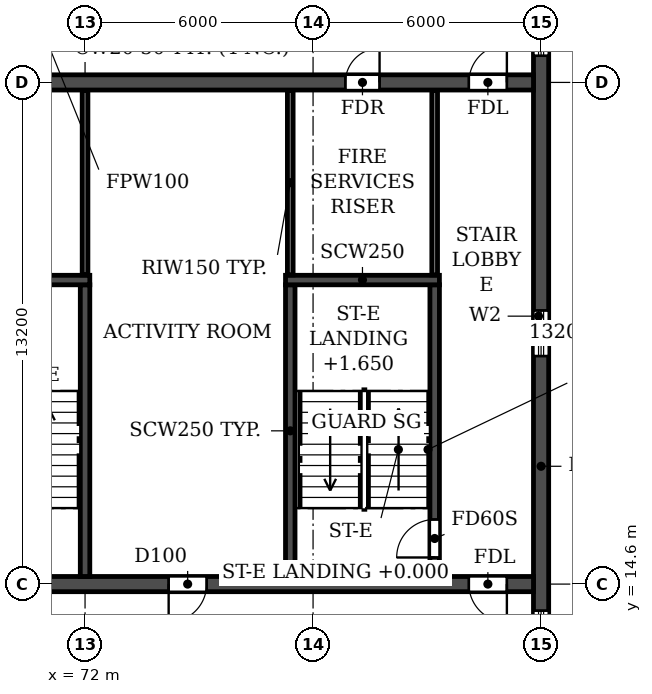
"""IFC4 building model, lengths in metres.
Left out: names, types, materials, properties, quantities, classifications, styles, units other than length and angle.
Written with IfcOpenShell. Run it as: python <this file> out.ifc"""

import sys

from ifc_helpers import new_model, si_unit, direction, frame, frame_2d, origin, place, context, subcontext, project, spatial, rectangle, extrude, element, fill, save


model = new_model("IFC4")
c1 = context("Model", 3, precision=1e-05, world=origin(), true_north=direction((0.0, 1.0)))
c2 = subcontext(c1, "Body", "Model", "MODEL_VIEW")
j1 = project(units=[si_unit("LENGTHUNIT", "METRE"), si_unit("PLANEANGLEUNIT", "RADIAN")], contexts=[c1])
p1 = place(None, origin())
s1 = spatial("IfcSite", under=j1, at=p1, CompositionType="ELEMENT")
p2 = place(p1, origin())
s2 = spatial("IfcBuilding", under=s1, at=p2, CompositionType="ELEMENT")
p3 = place(p2, frame((0.0, 0.0, 175.2)))
s3 = spatial("IfcBuildingStorey", under=s2, at=p3, CompositionType="ELEMENT", Elevation=175.2)
p4 = place(p3, frame((84.0, 4.683, 0.0), z_axis=(0.0, 0.0, 1.0), x_axis=(0.0, 1.0, 0.0)))
e1 = element("IfcWall", 1, at=p4, inside=s3, PredefinedType="SHEAR", context=c2, shape_type="SweptSolid", body=[
    extrude(rectangle(XDim=31.834, YDim=0.4, at=frame_2d((15.917, 0.0))), origin(), (0.0, 0.0, 1.0), 3.08),
])
p5 = place(p4, frame((23.817, 0.0, 0.9)))
e2 = element("IfcOpeningElement", 2, at=p5, cuts=e1, PredefinedType="OPENING", context=c2, shape_type="SweptSolid", body=[
    extrude(rectangle(XDim=1.2, YDim=1.5, at=frame_2d((0.6, 0.75))), frame((0.0, 0.21, 0.0), z_axis=(0.0, -1.0, 0.0), x_axis=(1.0, 0.0, 0.0)), (0.0, 0.0, 1.0), 0.42),
])
p6 = place(p4, frame((8.017, 0.0, 0.9)))
e3 = element("IfcOpeningElement", 3, at=p6, cuts=e1, PredefinedType="OPENING", context=c2, shape_type="SweptSolid", body=[
    extrude(rectangle(XDim=1.2, YDim=1.5, at=frame_2d((0.6, 0.75))), frame((0.0, 0.21, 0.0), z_axis=(0.0, -1.0, 0.0), x_axis=(1.0, 0.0, 0.0)), (0.0, 0.0, 1.0), 0.42),
])
p7 = place(p4, frame((27.694, 0.0, 0.6)))
e4 = element("IfcOpeningElement", 4, at=p7, cuts=e1, PredefinedType="OPENING", context=c2, shape_type="SweptSolid", body=[
    extrude(rectangle(XDim=2.2, YDim=1.8, at=frame_2d((1.1, 0.9))), frame((0.0, 0.21, 0.0), z_axis=(0.0, -1.0, 0.0), x_axis=(1.0, 0.0, 0.0)), (0.0, 0.0, 1.0), 0.42),
])
p8 = place(p4, frame((2.541, 0.0, 0.6)))
e5 = element("IfcOpeningElement", 5, at=p8, cuts=e1, PredefinedType="OPENING", context=c2, shape_type="SweptSolid", body=[
    extrude(rectangle(XDim=2.2, YDim=1.8, at=frame_2d((1.1, 0.9))), frame((0.0, 0.21, 0.0), z_axis=(0.0, -1.0, 0.0), x_axis=(1.0, 0.0, 0.0)), (0.0, 0.0, 1.0), 0.42),
])
p9 = place(p4, frame((15.917, 0.0, 0.9)))
e6 = element("IfcOpeningElement", 6, at=p9, cuts=e1, PredefinedType="OPENING", context=c2, shape_type="SweptSolid", body=[
    extrude(rectangle(XDim=1.2, YDim=1.5, at=frame_2d((0.6, 0.75))), frame((0.0, 0.21, 0.0), z_axis=(0.0, -1.0, 0.0), x_axis=(1.0, 0.0, 0.0)), (0.0, 0.0, 1.0), 0.42),
])
p10 = place(p3, frame((18.2, 14.6, 0.0), z_axis=(0.0, 0.0, 1.0), x_axis=(1.0, 0.0, 0.0)))
e7 = element("IfcWall", 7, at=p10, inside=s3, PredefinedType="SOLIDWALL", context=c2, shape_type="SweptSolid", body=[
    extrude(rectangle(XDim=65.6, YDim=0.4, at=frame_2d((32.8, 0.0))), origin(), (0.0, 0.0, 1.0), 3.08),
])
p11 = place(p10, frame((0.7, 0.0, 0.0)))
e8 = element("IfcOpeningElement", 8, at=p11, cuts=e7, PredefinedType="OPENING", context=c2, shape_type="SweptSolid", body=[
    extrude(rectangle(XDim=1.0, YDim=2.1, at=frame_2d((0.5, 1.05))), frame((0.0, 0.21, 0.0), z_axis=(0.0, -1.0, 0.0), x_axis=(1.0, 0.0, 0.0)), (0.0, 0.0, 1.0), 0.42),
])
p12 = place(p10, frame((8.6, 0.0, 0.0)))
e9 = element("IfcOpeningElement", 9, at=p12, cuts=e7, PredefinedType="OPENING", context=c2, shape_type="SweptSolid", body=[
    extrude(rectangle(XDim=1.0, YDim=2.1, at=frame_2d((0.5, 1.05))), frame((0.0, 0.21, 0.0), z_axis=(0.0, -1.0, 0.0), x_axis=(1.0, 0.0, 0.0)), (0.0, 0.0, 1.0), 0.42),
])
p13 = place(p10, frame((13.2, 0.0, 0.0)))
e10 = element("IfcOpeningElement", 10, at=p13, cuts=e7, PredefinedType="OPENING", context=c2, shape_type="SweptSolid", body=[
    extrude(rectangle(XDim=1.0, YDim=2.1, at=frame_2d((0.5, 1.05))), frame((0.0, 0.21, 0.0), z_axis=(0.0, -1.0, 0.0), x_axis=(1.0, 0.0, 0.0)), (0.0, 0.0, 1.0), 0.42),
])
p14 = place(p10, frame((25.8, 0.0, 0.0)))
e11 = element("IfcOpeningElement", 11, at=p14, cuts=e7, PredefinedType="OPENING", context=c2, shape_type="SweptSolid", body=[
    extrude(rectangle(XDim=1.0, YDim=2.1, at=frame_2d((0.5, 1.05))), frame((0.0, 0.21, 0.0), z_axis=(0.0, -1.0, 0.0), x_axis=(1.0, 0.0, 0.0)), (0.0, 0.0, 1.0), 0.42),
])
p15 = place(p10, frame((29.7, 0.0, 0.0)))
e12 = element("IfcOpeningElement", 12, at=p15, cuts=e7, PredefinedType="OPENING", context=c2, shape_type="SweptSolid", body=[
    extrude(rectangle(XDim=1.0, YDim=2.1, at=frame_2d((0.5, 1.05))), frame((0.0, 0.21, 0.0), z_axis=(0.0, -1.0, 0.0), x_axis=(1.0, 0.0, 0.0)), (0.0, 0.0, 1.0), 0.42),
])
p16 = place(p10, frame((32.3, 0.0, 0.0)))
e13 = element("IfcOpeningElement", 13, at=p16, cuts=e7, PredefinedType="OPENING", context=c2, shape_type="SweptSolid", body=[
    extrude(rectangle(XDim=1.0, YDim=2.1, at=frame_2d((0.5, 1.05))), frame((0.0, 0.21, 0.0), z_axis=(0.0, -1.0, 0.0), x_axis=(1.0, 0.0, 0.0)), (0.0, 0.0, 1.0), 0.42),
])
p17 = place(p10, frame((37.5, 0.0, 0.0)))
e14 = element("IfcOpeningElement", 14, at=p17, cuts=e7, PredefinedType="OPENING", context=c2, shape_type="SweptSolid", body=[
    extrude(rectangle(XDim=1.0, YDim=2.1, at=frame_2d((0.5, 1.05))), frame((0.0, 0.21, 0.0), z_axis=(0.0, -1.0, 0.0), x_axis=(1.0, 0.0, 0.0)), (0.0, 0.0, 1.0), 0.42),
])
p18 = place(p10, frame((51.4, 0.0, 0.0)))
e15 = element("IfcOpeningElement", 15, at=p18, cuts=e7, PredefinedType="OPENING", context=c2, shape_type="SweptSolid", body=[
    extrude(rectangle(XDim=1.0, YDim=2.1, at=frame_2d((0.5, 1.05))), frame((0.0, 0.21, 0.0), z_axis=(0.0, -1.0, 0.0), x_axis=(1.0, 0.0, 0.0)), (0.0, 0.0, 1.0), 0.42),
])
p19 = place(p10, frame((56.0, 0.0, 0.0)))
e16 = element("IfcOpeningElement", 16, at=p19, cuts=e7, PredefinedType="OPENING", context=c2, shape_type="SweptSolid", body=[
    extrude(rectangle(XDim=1.0, YDim=2.1, at=frame_2d((0.5, 1.05))), frame((0.0, 0.21, 0.0), z_axis=(0.0, -1.0, 0.0), x_axis=(1.0, 0.0, 0.0)), (0.0, 0.0, 1.0), 0.42),
])
p20 = place(p10, frame((63.9, 0.0, 0.0)))
e17 = element("IfcOpeningElement", 17, at=p20, cuts=e7, PredefinedType="OPENING", context=c2, shape_type="SweptSolid", body=[
    extrude(rectangle(XDim=1.0, YDim=2.1, at=frame_2d((0.5, 1.05))), frame((0.0, 0.21, 0.0), z_axis=(0.0, -1.0, 0.0), x_axis=(1.0, 0.0, 0.0)), (0.0, 0.0, 1.0), 0.42),
])
p21 = place(p3, frame((18.2, 27.8, 0.0), z_axis=(0.0, 0.0, 1.0), x_axis=(1.0, 0.0, 0.0)))
e18 = element("IfcWall", 18, at=p21, inside=s3, PredefinedType="SOLIDWALL", context=c2, shape_type="SweptSolid", body=[
    extrude(rectangle(XDim=65.6, YDim=0.4, at=frame_2d((32.8, 0.0))), origin(), (0.0, 0.0, 1.0), 3.08),
])
p22 = place(p21, frame((0.7, 0.0, 0.0)))
e19 = element("IfcOpeningElement", 19, at=p22, cuts=e18, PredefinedType="OPENING", context=c2, shape_type="SweptSolid", body=[
    extrude(rectangle(XDim=1.0, YDim=2.1, at=frame_2d((0.5, 1.05))), frame((0.0, 0.21, 0.0), z_axis=(0.0, -1.0, 0.0), x_axis=(1.0, 0.0, 0.0)), (0.0, 0.0, 1.0), 0.42),
])
p23 = place(p21, frame((4.05, 0.0, 0.0)))
e20 = element("IfcOpeningElement", 20, at=p23, cuts=e18, PredefinedType="OPENING", context=c2, shape_type="SweptSolid", body=[
    extrude(rectangle(XDim=0.9, YDim=2.1, at=frame_2d((0.45, 1.05))), frame((0.0, 0.21, 0.0), z_axis=(0.0, -1.0, 0.0), x_axis=(1.0, 0.0, 0.0)), (0.0, 0.0, 1.0), 0.42),
])
p24 = place(p21, frame((13.25, 0.0, 0.0)))
e21 = element("IfcOpeningElement", 21, at=p24, cuts=e18, PredefinedType="OPENING", context=c2, shape_type="SweptSolid", body=[
    extrude(rectangle(XDim=0.9, YDim=2.1, at=frame_2d((0.45, 1.05))), frame((0.0, 0.21, 0.0), z_axis=(0.0, -1.0, 0.0), x_axis=(1.0, 0.0, 0.0)), (0.0, 0.0, 1.0), 0.42),
])
p25 = place(p21, frame((17.7, 0.0, 0.0)))
e22 = element("IfcOpeningElement", 22, at=p25, cuts=e18, PredefinedType="OPENING", context=c2, shape_type="SweptSolid", body=[
    extrude(rectangle(XDim=1.0, YDim=2.1, at=frame_2d((0.5, 1.05))), frame((0.0, 0.21, 0.0), z_axis=(0.0, -1.0, 0.0), x_axis=(1.0, 0.0, 0.0)), (0.0, 0.0, 1.0), 0.42),
])
p26 = place(p21, frame((22.9, 0.0, 0.0)))
e23 = element("IfcOpeningElement", 23, at=p26, cuts=e18, PredefinedType="OPENING", context=c2, shape_type="SweptSolid", body=[
    extrude(rectangle(XDim=1.0, YDim=2.1, at=frame_2d((0.5, 1.05))), frame((0.0, 0.21, 0.0), z_axis=(0.0, -1.0, 0.0), x_axis=(1.0, 0.0, 0.0)), (0.0, 0.0, 1.0), 0.42),
])
p27 = place(p21, frame((29.4, 0.0, 0.0)))
e24 = element("IfcOpeningElement", 24, at=p27, cuts=e18, PredefinedType="OPENING", context=c2, shape_type="SweptSolid", body=[
    extrude(rectangle(XDim=1.0, YDim=2.1, at=frame_2d((0.5, 1.05))), frame((0.0, 0.21, 0.0), z_axis=(0.0, -1.0, 0.0), x_axis=(1.0, 0.0, 0.0)), (0.0, 0.0, 1.0), 0.42),
])
p28 = place(p21, frame((32.3, 0.0, 0.0)))
e25 = element("IfcOpeningElement", 25, at=p28, cuts=e18, PredefinedType="OPENING", context=c2, shape_type="SweptSolid", body=[
    extrude(rectangle(XDim=1.0, YDim=2.1, at=frame_2d((0.5, 1.05))), frame((0.0, 0.21, 0.0), z_axis=(0.0, -1.0, 0.0), x_axis=(1.0, 0.0, 0.0)), (0.0, 0.0, 1.0), 0.42),
])
p29 = place(p21, frame((36.5, 0.0, 0.0)))
e26 = element("IfcOpeningElement", 26, at=p29, cuts=e18, PredefinedType="OPENING", context=c2, shape_type="SweptSolid", body=[
    extrude(rectangle(XDim=1.0, YDim=2.1, at=frame_2d((0.5, 1.05))), frame((0.0, 0.21, 0.0), z_axis=(0.0, -1.0, 0.0), x_axis=(1.0, 0.0, 0.0)), (0.0, 0.0, 1.0), 0.42),
])
p30 = place(p21, frame((41.7, 0.0, 0.0)))
e27 = element("IfcOpeningElement", 27, at=p30, cuts=e18, PredefinedType="OPENING", context=c2, shape_type="SweptSolid", body=[
    extrude(rectangle(XDim=1.0, YDim=2.1, at=frame_2d((0.5, 1.05))), frame((0.0, 0.21, 0.0), z_axis=(0.0, -1.0, 0.0), x_axis=(1.0, 0.0, 0.0)), (0.0, 0.0, 1.0), 0.42),
])
p31 = place(p21, frame((45.6, 0.0, 0.0)))
e28 = element("IfcOpeningElement", 28, at=p31, cuts=e18, PredefinedType="OPENING", context=c2, shape_type="SweptSolid", body=[
    extrude(rectangle(XDim=1.0, YDim=2.1, at=frame_2d((0.5, 1.05))), frame((0.0, 0.21, 0.0), z_axis=(0.0, -1.0, 0.0), x_axis=(1.0, 0.0, 0.0)), (0.0, 0.0, 1.0), 0.42),
])
p32 = place(p21, frame((48.2, 0.0, 0.0)))
e29 = element("IfcOpeningElement", 29, at=p32, cuts=e18, PredefinedType="OPENING", context=c2, shape_type="SweptSolid", body=[
    extrude(rectangle(XDim=1.0, YDim=2.1, at=frame_2d((0.5, 1.05))), frame((0.0, 0.21, 0.0), z_axis=(0.0, -1.0, 0.0), x_axis=(1.0, 0.0, 0.0)), (0.0, 0.0, 1.0), 0.42),
])
p33 = place(p21, frame((51.45, 0.0, 0.0)))
e30 = element("IfcOpeningElement", 30, at=p33, cuts=e18, PredefinedType="OPENING", context=c2, shape_type="SweptSolid", body=[
    extrude(rectangle(XDim=0.9, YDim=2.1, at=frame_2d((0.45, 1.05))), frame((0.0, 0.21, 0.0), z_axis=(0.0, -1.0, 0.0), x_axis=(1.0, 0.0, 0.0)), (0.0, 0.0, 1.0), 0.42),
])
p34 = place(p21, frame((60.65, 0.0, 0.0)))
e31 = element("IfcOpeningElement", 31, at=p34, cuts=e18, PredefinedType="OPENING", context=c2, shape_type="SweptSolid", body=[
    extrude(rectangle(XDim=0.9, YDim=2.1, at=frame_2d((0.45, 1.05))), frame((0.0, 0.21, 0.0), z_axis=(0.0, -1.0, 0.0), x_axis=(1.0, 0.0, 0.0)), (0.0, 0.0, 1.0), 0.42),
])
p35 = place(p21, frame((63.9, 0.0, 0.0)))
e32 = element("IfcOpeningElement", 32, at=p35, cuts=e18, PredefinedType="OPENING", context=c2, shape_type="SweptSolid", body=[
    extrude(rectangle(XDim=1.0, YDim=2.1, at=frame_2d((0.5, 1.05))), frame((0.0, 0.21, 0.0), z_axis=(0.0, -1.0, 0.0), x_axis=(1.0, 0.0, 0.0)), (0.0, 0.0, 1.0), 0.42),
])
p36 = place(p3, frame((72.0, 14.8, 0.0), z_axis=(0.0, 0.0, 1.0), x_axis=(0.0, 1.0, 0.0)))
e33 = element("IfcWall", 33, at=p36, inside=s3, PredefinedType="SOLIDWALL", context=c2, shape_type="SweptSolid", body=[
    extrude(rectangle(XDim=7.675, YDim=0.25, at=frame_2d((3.837, 0.0))), origin(), (0.0, 0.0, 1.0), 3.08),
])
p37 = place(p3, frame((68.075, 22.6, 0.0), z_axis=(0.0, 0.0, 1.0), x_axis=(1.0, 0.0, 0.0)))
e34 = element("IfcWall", 34, at=p37, inside=s3, PredefinedType="SOLIDWALL", context=c2, shape_type="SweptSolid", body=[
    extrude(rectangle(XDim=4.05, YDim=0.25, at=frame_2d((2.025, 0.0))), origin(), (0.0, 0.0, 1.0), 3.08),
])
p38 = place(p3, frame((77.4, 14.8, 0.0), z_axis=(0.0, 0.0, 1.0), x_axis=(0.0, 1.0, 0.0)))
e35 = element("IfcWall", 35, at=p38, inside=s3, PredefinedType="SOLIDWALL", context=c2, shape_type="SweptSolid", body=[
    extrude(rectangle(XDim=7.675, YDim=0.25, at=frame_2d((3.837, 0.0))), origin(), (0.0, 0.0, 1.0), 3.08),
])
p39 = place(p3, frame((81.2, 14.8, 0.0), z_axis=(0.0, 0.0, 1.0), x_axis=(0.0, 1.0, 0.0)))
e36 = element("IfcWall", 36, at=p39, inside=s3, PredefinedType="SOLIDWALL", context=c2, shape_type="SweptSolid", body=[
    extrude(rectangle(XDim=7.675, YDim=0.25, at=frame_2d((3.837, 0.0))), origin(), (0.0, 0.0, 1.0), 3.08),
])
p40 = place(p39, frame((0.5, 0.0, 0.0)))
e37 = element("IfcOpeningElement", 37, at=p40, cuts=e36, PredefinedType="OPENING", context=c2, shape_type="SweptSolid", body=[
    extrude(rectangle(XDim=1.0, YDim=2.1, at=frame_2d((0.5, 1.05))), frame((0.0, 0.135, 0.0), z_axis=(0.0, -1.0, 0.0), x_axis=(1.0, 0.0, 0.0)), (0.0, 0.0, 1.0), 0.27),
])
p41 = place(p3, frame((77.275, 22.6, 0.0), z_axis=(0.0, 0.0, 1.0), x_axis=(1.0, 0.0, 0.0)))
e38 = element("IfcWall", 38, at=p41, inside=s3, PredefinedType="SOLIDWALL", context=c2, shape_type="SweptSolid", body=[
    extrude(rectangle(XDim=4.05, YDim=0.25, at=frame_2d((2.025, 0.0))), origin(), (0.0, 0.0, 1.0), 3.08),
])
for number, where, z_axis, x_axis in (
    (39, (72.0, 22.735, 0.0), (0.0, 0.0, 1.0), (0.0, 1.0, 0.0)),
    (40, (77.4, 22.735, 0.0), (0.0, 0.0, 1.0), (0.0, 1.0, 0.0)),
    (41, (81.2, 22.735, 0.0), (0.0, 0.0, 1.0), (0.0, 1.0, 0.0)),
):
    element("IfcWall", number, at=place(p3, frame(where, z_axis=z_axis, x_axis=x_axis)), inside=s3, PredefinedType="PARTITIONING", context=c2, shape_type="SweptSolid", body=[
        extrude(rectangle(XDim=4.855, YDim=0.15, at=frame_2d((2.427, 0.0))), origin(), (0.0, 0.0, 1.0), 3.08),
    ])
p42 = place(p5, origin())
e42 = element("IfcWindow", 42, at=p42, inside=s3, PartitioningType="SINGLE_PANEL", PredefinedType="WINDOW", context=c2, shape_type="SweptSolid", body=[
    extrude(rectangle(XDim=1.2, YDim=1.5, at=frame_2d((0.6, 0.75))), frame((0.0, 0.03, 0.0), z_axis=(0.0, -1.0, 0.0), x_axis=(1.0, 0.0, 0.0)), (0.0, 0.0, 1.0), 0.06),
])
fill(e2, e42)
p43 = place(p6, origin())
e43 = element("IfcWindow", 43, at=p43, inside=s3, PartitioningType="SINGLE_PANEL", PredefinedType="WINDOW", context=c2, shape_type="SweptSolid", body=[
    extrude(rectangle(XDim=1.2, YDim=1.5, at=frame_2d((0.6, 0.75))), frame((0.0, 0.03, 0.0), z_axis=(0.0, -1.0, 0.0), x_axis=(1.0, 0.0, 0.0)), (0.0, 0.0, 1.0), 0.06),
])
fill(e3, e43)
p44 = place(p9, origin())
e44 = element("IfcWindow", 44, at=p44, inside=s3, PartitioningType="SINGLE_PANEL", PredefinedType="WINDOW", context=c2, shape_type="SweptSolid", body=[
    extrude(rectangle(XDim=1.2, YDim=1.5, at=frame_2d((0.6, 0.75))), frame((0.0, 0.03, 0.0), z_axis=(0.0, -1.0, 0.0), x_axis=(1.0, 0.0, 0.0)), (0.0, 0.0, 1.0), 0.06),
])
fill(e6, e44)
p45 = place(p34, origin())
e45 = element("IfcDoor", 45, at=p45, inside=s3, OperationType="SINGLE_SWING_RIGHT", PredefinedType="DOOR", context=c2, shape_type="SweptSolid", body=[
    extrude(rectangle(XDim=0.9, YDim=2.1, at=frame_2d((0.45, 1.05))), frame((0.0, 0.025, 0.0), z_axis=(0.0, -1.0, 0.0), x_axis=(1.0, 0.0, 0.0)), (0.0, 0.0, 1.0), 0.05),
])
fill(e31, e45)
p46 = place(p35, origin())
e46 = element("IfcDoor", 46, at=p46, inside=s3, OperationType="SINGLE_SWING_RIGHT", PredefinedType="DOOR", context=c2, shape_type="SweptSolid", body=[
    extrude(rectangle(XDim=1.0, YDim=2.1, at=frame_2d((0.5, 1.05))), frame((0.0, 0.025, 0.0), z_axis=(0.0, -1.0, 0.0), x_axis=(1.0, 0.0, 0.0)), (0.0, 0.0, 1.0), 0.05),
])
fill(e32, e46)
p47 = place(p19, frame((1.0, 0.0, 0.0), z_axis=(0.0, 0.0, 1.0), x_axis=(-1.0, 0.0, 0.0)))
e47 = element("IfcDoor", 47, at=p47, inside=s3, OperationType="SINGLE_SWING_RIGHT", PredefinedType="DOOR", context=c2, shape_type="SweptSolid", body=[
    extrude(rectangle(XDim=1.0, YDim=2.1, at=frame_2d((0.5, 1.05))), frame((0.0, 0.025, 0.0), z_axis=(0.0, -1.0, 0.0), x_axis=(1.0, 0.0, 0.0)), (0.0, 0.0, 1.0), 0.05),
])
fill(e16, e47)
p48 = place(p20, frame((1.0, 0.0, 0.0), z_axis=(0.0, 0.0, 1.0), x_axis=(-1.0, 0.0, 0.0)))
e48 = element("IfcDoor", 48, at=p48, inside=s3, OperationType="SINGLE_SWING_LEFT", PredefinedType="DOOR", context=c2, shape_type="SweptSolid", body=[
    extrude(rectangle(XDim=1.0, YDim=2.1, at=frame_2d((0.5, 1.05))), frame((0.0, 0.025, 0.0), z_axis=(0.0, -1.0, 0.0), x_axis=(1.0, 0.0, 0.0)), (0.0, 0.0, 1.0), 0.05),
])
fill(e17, e48)
p49 = place(p40, origin())
e49 = element("IfcDoor", 49, at=p49, inside=s3, OperationType="SINGLE_SWING_LEFT", PredefinedType="DOOR", context=c2, shape_type="SweptSolid", body=[
    extrude(rectangle(XDim=1.0, YDim=2.1, at=frame_2d((0.5, 1.05))), frame((0.0, 0.025, 0.0), z_axis=(0.0, -1.0, 0.0), x_axis=(1.0, 0.0, 0.0)), (0.0, 0.0, 1.0), 0.05),
])
fill(e37, e49)
save(model, sys.argv[1])
